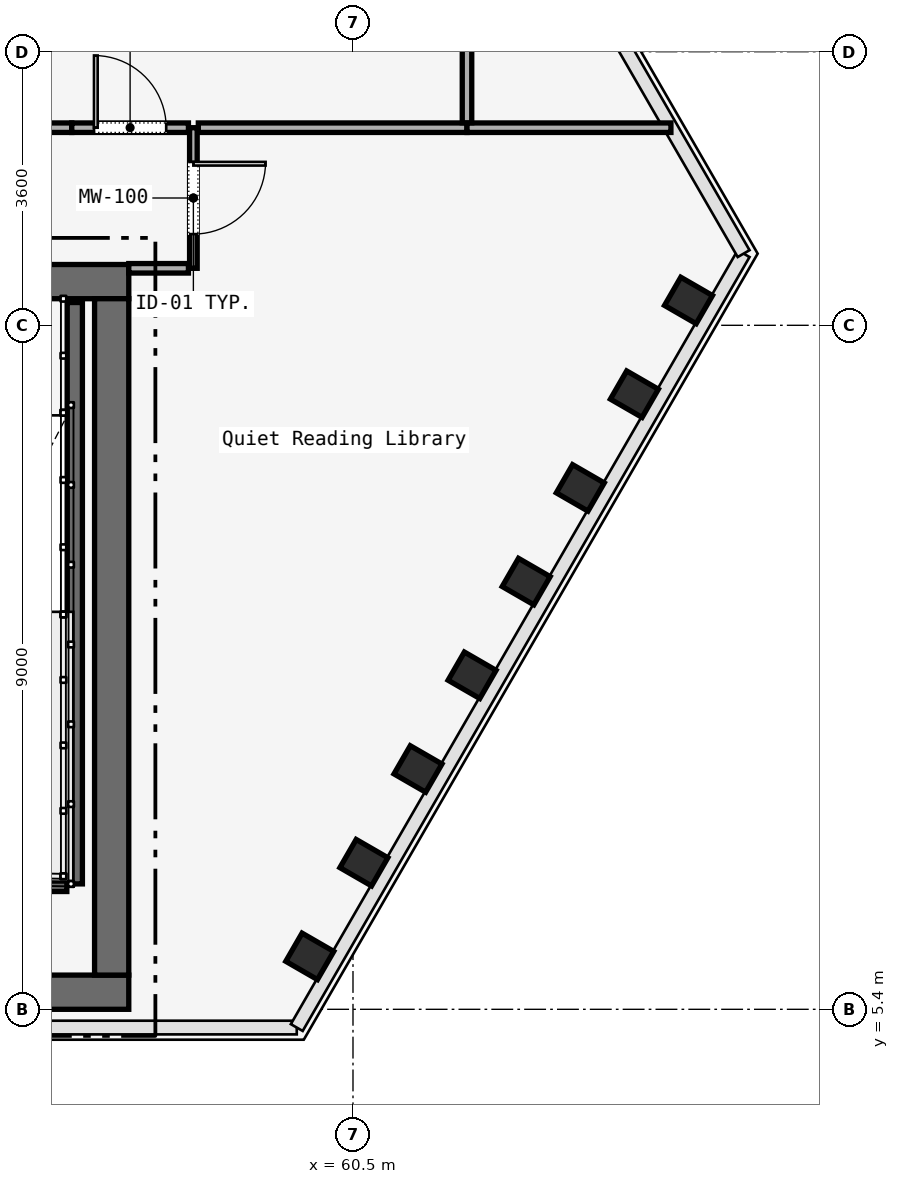
"""IFC4 building model, lengths in metres.
Left out: names, types, materials, properties, quantities, classifications, styles, units other than length and angle.
Written with IfcOpenShell. Run it as: python <this file> out.ifc"""

import sys

from ifc_helpers import new_model, si_unit, direction, frame, frame_2d, origin, origin_2d, place, context, subcontext, project, spatial, rectangle, i_section, extrude, element, fill, save


model = new_model("IFC4")
c1 = context("Model", 3, precision=1e-05, world=origin(), true_north=direction((0.0, 1.0)))
c2 = subcontext(c1, "Body", "Model", "MODEL_VIEW")
j1 = project(units=[si_unit("LENGTHUNIT", "METRE"), si_unit("PLANEANGLEUNIT", "RADIAN")], contexts=[c1])
p1 = place(None, origin())
s1 = spatial("IfcSite", under=j1, at=p1, CompositionType="ELEMENT")
p2 = place(p1, origin())
s2 = spatial("IfcBuilding", under=s1, at=p2, CompositionType="ELEMENT")
p3 = place(p2, frame((0.0, 0.0, 138.4)))
s3 = spatial("IfcBuildingStorey", under=s2, at=p3, CompositionType="ELEMENT", Elevation=138.4)
p4 = place(p3, frame((26.45, 14.975, 0.0), z_axis=(0.0, 0.0, 1.0), x_axis=(1.0, 0.0, 0.0)))
e1 = element("IfcWall", 1, at=p4, inside=s3, PredefinedType="SOLIDWALL", context=c2, shape_type="SweptSolid", body=[
    extrude(rectangle(XDim=31.1, YDim=0.45, at=frame_2d((15.55, 0.0))), origin(), (0.0, 0.0, 1.0), 3.58),
])
p5 = place(p4, frame((1.65, 0.0, 0.0)))
e2 = element("IfcOpeningElement", 2, at=p5, cuts=e1, PredefinedType="OPENING", context=c2, shape_type="SweptSolid", body=[
    extrude(rectangle(XDim=1.1, YDim=2.2, at=frame_2d((0.55, 1.1))), frame((0.0, 0.225, 0.0), z_axis=(0.0, -1.0, 0.0), x_axis=(1.0, 0.0, 0.0)), (0.0, 0.0, 1.0), 0.45),
])
p6 = place(p4, frame((13.65, 0.0, 0.0)))
e3 = element("IfcOpeningElement", 3, at=p6, cuts=e1, PredefinedType="OPENING", context=c2, shape_type="SweptSolid", body=[
    extrude(rectangle(XDim=1.1, YDim=2.2, at=frame_2d((0.55, 1.1))), frame((0.0, 0.225, 0.0), z_axis=(0.0, -1.0, 0.0), x_axis=(1.0, 0.0, 0.0)), (0.0, 0.0, 1.0), 0.45),
])
p7 = place(p4, frame((25.55, 0.0, 0.0)))
e4 = element("IfcOpeningElement", 4, at=p7, cuts=e1, PredefinedType="OPENING", context=c2, shape_type="SweptSolid", body=[
    extrude(rectangle(XDim=1.1, YDim=2.2, at=frame_2d((0.55, 1.1))), frame((0.0, 0.225, 0.0), z_axis=(0.0, -1.0, 0.0), x_axis=(1.0, 0.0, 0.0)), (0.0, 0.0, 1.0), 0.45),
])
p8 = place(p4, frame((10.7, 0.0, 0.0)))
e5 = element("IfcOpeningElement", 5, at=p8, cuts=e1, PredefinedType="OPENING", context=c2, shape_type="SweptSolid", body=[
    extrude(rectangle(XDim=1.4, YDim=2.2, at=frame_2d((0.7, 1.1))), frame((0.0, 0.225, 0.0), z_axis=(0.0, -1.0, 0.0), x_axis=(1.0, 0.0, 0.0)), (0.0, 0.0, 1.0), 0.45),
])
p9 = place(p4, frame((19.35, 0.0, 0.0)))
e6 = element("IfcOpeningElement", 6, at=p9, cuts=e1, PredefinedType="OPENING", context=c2, shape_type="SweptSolid", body=[
    extrude(rectangle(XDim=1.1, YDim=2.2, at=frame_2d((0.55, 1.1))), frame((0.0, 0.225, 0.0), z_axis=(0.0, -1.0, 0.0), x_axis=(1.0, 0.0, 0.0)), (0.0, 0.0, 1.0), 0.45),
])
p10 = place(p4, frame((21.4, 0.0, 0.0)))
e7 = element("IfcOpeningElement", 7, at=p10, cuts=e1, PredefinedType="OPENING", context=c2, shape_type="SweptSolid", body=[
    extrude(rectangle(XDim=0.9, YDim=2.1, at=frame_2d((0.45, 1.05))), frame((0.0, 0.225, 0.0), z_axis=(0.0, -1.0, 0.0), x_axis=(1.0, 0.0, 0.0)), (0.0, 0.0, 1.0), 0.45),
])
p11 = place(p4, frame((23.35, 0.0, 0.0)))
e8 = element("IfcOpeningElement", 8, at=p11, cuts=e1, PredefinedType="OPENING", context=c2, shape_type="SweptSolid", body=[
    extrude(rectangle(XDim=1.3, YDim=2.3, at=frame_2d((0.65, 1.15))), frame((0.0, 0.225, 0.0), z_axis=(0.0, -1.0, 0.0), x_axis=(1.0, 0.0, 0.0)), (0.0, 0.0, 1.0), 0.45),
])
p12 = place(p3, frame((26.45, 5.625, 0.0), z_axis=(0.0, 0.0, 1.0), x_axis=(1.0, 0.0, 0.0)))
e9 = element("IfcWall", 9, at=p12, inside=s3, PredefinedType="SOLIDWALL", context=c2, shape_type="SweptSolid", body=[
    extrude(rectangle(XDim=31.1, YDim=0.45, at=frame_2d((15.55, 0.0))), origin(), (0.0, 0.0, 1.0), 3.58),
])
p13 = place(p3, frame((57.325, 5.85, 0.0), z_axis=(0.0, 0.0, 1.0), x_axis=(0.0, 1.0, 0.0)))
e10 = element("IfcWall", 10, at=p13, inside=s3, PredefinedType="SOLIDWALL", context=c2, shape_type="SweptSolid", body=[
    extrude(rectangle(XDim=8.9, YDim=0.45, at=frame_2d((4.45, 0.0))), origin(), (0.0, 0.0, 1.0), 3.58),
])
for number, where, z_axis, x_axis in (
    (11, (59.931, 6.096, 0.0), (0.0, 0.0, 1.0), (0.5, 0.866, 0.0)),
    (12, (60.643, 7.329, 0.0), (0.0, 0.0, 1.0), (0.5, 0.866, 0.0)),
    (13, (61.355, 8.562, 0.0), (0.0, 0.0, 1.0), (0.5, 0.866, 0.0)),
    (14, (62.067, 9.795, 0.0), (0.0, 0.0, 1.0), (0.5, 0.866, 0.0)),
    (15, (62.779, 11.028, 0.0), (0.0, 0.0, 1.0), (0.5, 0.866, 0.0)),
    (16, (63.49, 12.261, 0.0), (0.0, 0.0, 1.0), (0.5, 0.866, 0.0)),
    (17, (64.202, 13.494, 0.0), (0.0, 0.0, 1.0), (0.5, 0.866, 0.0)),
    (18, (64.914, 14.727, 0.0), (0.0, 0.0, 1.0), (0.5, 0.866, 0.0)),
):
    element("IfcColumn", number, at=place(p3, frame(where, z_axis=z_axis, x_axis=x_axis)), inside=s3, PredefinedType="COLUMN", context=c2, shape_type="SweptSolid", body=[
        extrude(i_section(OverallWidth=0.428, OverallDepth=0.481, WebThickness=0.051, FlangeThickness=0.065, FilletRadius=0.015, at=origin_2d()), origin(), (0.0, 0.0, 1.0), 3.58),
    ])
p14 = place(p3, frame((56.84, 14.7, 0.0), z_axis=(0.0, 0.0, 1.0), x_axis=(0.0, -1.0, 0.0)))
e19 = element("IfcWall", 19, at=p14, inside=s3, PredefinedType="SOLIDWALL", context=c2, shape_type="SweptSolid", body=[
    extrude(rectangle(XDim=7.65, YDim=0.2, at=frame_2d((3.825, 0.0))), origin(), (0.0, 0.0, 1.0), 3.8),
])
p15 = place(p3, frame((53.62, 7.05, 0.0), z_axis=(0.0, 0.0, 1.0), x_axis=(1.0, 0.0, 0.0)))
e20 = element("IfcWall", 20, at=p15, inside=s3, PredefinedType="SOLIDWALL", context=c2, shape_type="SweptSolid", body=[
    extrude(rectangle(XDim=3.115, YDim=0.2, at=frame_2d((1.558, 0.0))), origin(), (0.0, 0.0, 1.0), 3.8),
])
p16 = place(p3, frame((58.4, 17.0, 0.0), z_axis=(0.0, 0.0, 1.0), x_axis=(0.0, -1.0, 0.0)))
e21 = element("IfcWall", 21, at=p16, inside=s3, PredefinedType="MOVABLE", context=c2, shape_type="SweptSolid", body=[
    extrude(rectangle(XDim=1.85, YDim=0.1, at=frame_2d((0.925, 0.0))), origin(), (0.0, 0.0, 1.0), 3.01),
])
p17 = place(p16, frame((0.45, 0.0, 0.0)))
e22 = element("IfcOpeningElement", 22, at=p17, cuts=e21, PredefinedType="OPENING", context=c2, shape_type="SweptSolid", body=[
    extrude(rectangle(XDim=0.95, YDim=2.2, at=frame_2d((0.475, 1.1))), frame((0.0, 0.05, 0.0), z_axis=(0.0, -1.0, 0.0), x_axis=(1.0, 0.0, 0.0)), (0.0, 0.0, 1.0), 0.1),
])
p18 = place(p3, frame((58.335, 15.15, 0.0), z_axis=(0.0, 0.0, 1.0), x_axis=(-1.0, 0.0, 0.0)))
e23 = element("IfcWall", 23, at=p18, inside=s3, PredefinedType="PARTITIONING", context=c2, shape_type="SweptSolid", body=[
    extrude(rectangle(XDim=0.785, YDim=0.125, at=frame_2d((0.393, 0.0))), origin(), (0.0, 0.0, 1.0), 3.01),
])
p19 = place(p3, frame((55.852, 17.0, 0.0), z_axis=(0.0, 0.0, 1.0), x_axis=(1.0, 0.0, 0.0)))
e24 = element("IfcWall", 24, at=p19, inside=s3, PredefinedType="PARTITIONING", context=c2, shape_type="SweptSolid", body=[
    extrude(rectangle(XDim=0.948, YDim=0.125, at=frame_2d((0.474, 0.0))), origin(), (0.0, 0.0, 1.0), 3.01),
])
p20 = place(p3, frame((56.8, 17.0, 0.0), z_axis=(0.0, 0.0, 1.0), x_axis=(1.0, 0.0, 0.0)))
e25 = element("IfcWall", 25, at=p20, inside=s3, PredefinedType="PARTITIONING", context=c2, shape_type="SweptSolid", body=[
    extrude(rectangle(XDim=1.535, YDim=0.125, at=frame_2d((0.768, 0.0))), origin(), (0.0, 0.0, 1.0), 3.01),
])
p21 = place(p20, frame((0.292, 0.0, 0.0)))
e26 = element("IfcOpeningElement", 26, at=p21, cuts=e25, PredefinedType="OPENING", context=c2, shape_type="SweptSolid", body=[
    extrude(rectangle(XDim=0.95, YDim=2.2, at=frame_2d((0.475, 1.1))), frame((0.0, 0.062, 0.0), z_axis=(0.0, -1.0, 0.0), x_axis=(1.0, 0.0, 0.0)), (0.0, 0.0, 1.0), 0.125),
])
p22 = place(p3, frame((58.465, 17.0, 0.0), z_axis=(0.0, 0.0, 1.0), x_axis=(1.0, 0.0, 0.0)))
e27 = element("IfcWall", 27, at=p22, inside=s3, PredefinedType="PARTITIONING", context=c2, shape_type="SweptSolid", body=[
    extrude(rectangle(XDim=3.535, YDim=0.125, at=frame_2d((1.768, 0.0))), origin(), (0.0, 0.0, 1.0), 3.01),
])
p23 = place(p3, frame((62.0, 17.0, 0.0), z_axis=(0.0, 0.0, 1.0), x_axis=(1.0, 0.0, 0.0)))
e28 = element("IfcWall", 28, at=p23, inside=s3, PredefinedType="PARTITIONING", context=c2, shape_type="SweptSolid", body=[
    extrude(rectangle(XDim=2.683, YDim=0.125, at=frame_2d((1.342, 0.0))), origin(), (0.0, 0.0, 1.0), 3.01),
])
p24 = place(p3, frame((62.0, 21.647, 0.0), z_axis=(0.0, 0.0, 1.0), x_axis=(0.0, -1.0, 0.0)))
e29 = element("IfcWall", 29, at=p24, inside=s3, PredefinedType="PARTITIONING", context=c2, shape_type="SweptSolid", body=[
    extrude(rectangle(XDim=4.582, YDim=0.125, at=frame_2d((2.291, 0.0))), origin(), (0.0, 0.0, 1.0), 3.01),
])
p25 = place(p17, origin())
e30 = element("IfcDoor", 30, at=p25, inside=s3, OperationType="SINGLE_SWING_RIGHT", PredefinedType="DOOR", context=c2, shape_type="SweptSolid", body=[
    extrude(rectangle(XDim=0.95, YDim=2.2, at=frame_2d((0.475, 1.1))), frame((0.0, 0.025, 0.0), z_axis=(0.0, -1.0, 0.0), x_axis=(1.0, 0.0, 0.0)), (0.0, 0.0, 1.0), 0.05),
])
fill(e22, e30)
p26 = place(p21, origin())
e31 = element("IfcDoor", 31, at=p26, inside=s3, OperationType="SINGLE_SWING_RIGHT", PredefinedType="DOOR", context=c2, shape_type="SweptSolid", body=[
    extrude(rectangle(XDim=0.95, YDim=2.2, at=frame_2d((0.475, 1.1))), frame((0.0, 0.025, 0.0), z_axis=(0.0, -1.0, 0.0), x_axis=(1.0, 0.0, 0.0)), (0.0, 0.0, 1.0), 0.05),
])
fill(e26, e31)
save(model, sys.argv[1])
